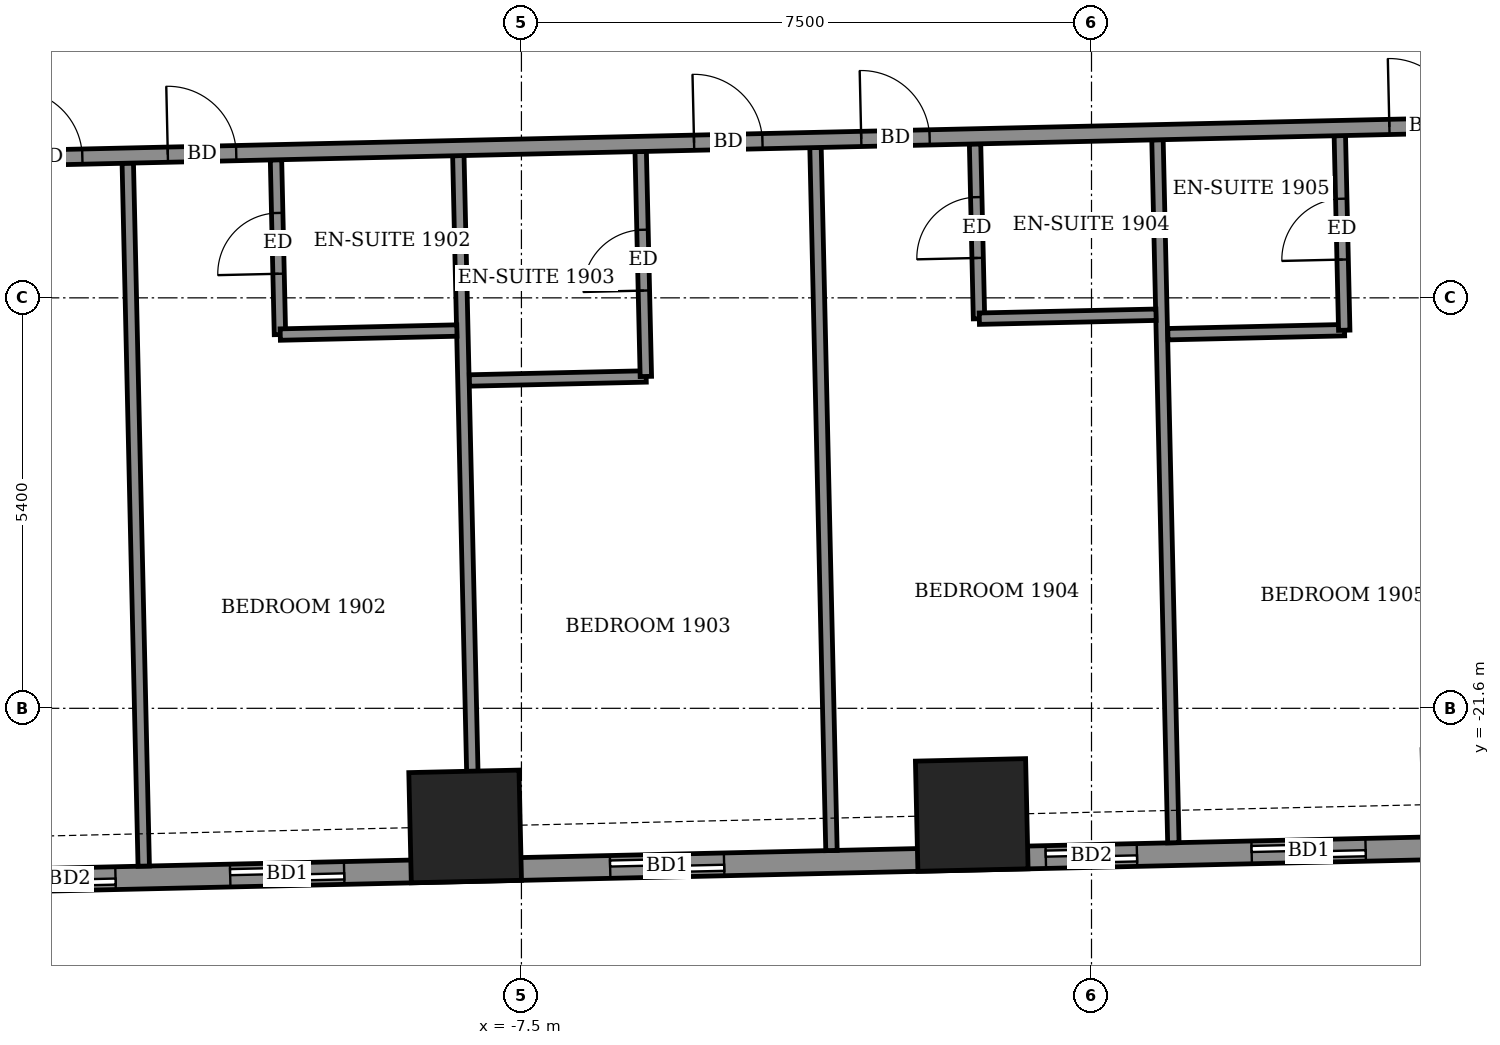
"""IFC4 building model, lengths in metres.
Left out: names, types, materials, properties, quantities, classifications, styles, units other than length and angle.
Written with IfcOpenShell. Run it as: python <this file> out.ifc"""

import sys

from ifc_helpers import new_model, si_unit, direction, frame, frame_2d, origin, origin_2d, place, context, subcontext, project, spatial, rectangle, extrude, element, fill, save


model = new_model("IFC4")
c1 = context("Model", 3, precision=1e-05, world=origin(), true_north=direction((0.0, 1.0)))
c2 = subcontext(c1, "Body", "Model", "MODEL_VIEW")
j1 = project(units=[si_unit("LENGTHUNIT", "METRE"), si_unit("PLANEANGLEUNIT", "RADIAN")], contexts=[c1])
p1 = place(None, origin())
s1 = spatial("IfcSite", under=j1, at=p1, CompositionType="ELEMENT")
p2 = place(p1, origin())
s2 = spatial("IfcBuilding", under=s1, at=p2, CompositionType="ELEMENT")
p3 = place(p2, frame((0.0, 0.0, 79.3)))
s3 = spatial("IfcBuildingStorey", under=s2, at=p3, CompositionType="ELEMENT", Elevation=79.3)
for number, where, z_axis, x_axis in (
    (1, (-8.24, -23.154, -0.55), (0.0, 0.0, 1.0), (1.0, 0.023, 0.0)),
    (2, (-1.575, -23.003, -0.55), (0.0, 0.0, 1.0), (1.0, 0.023, 0.0)),
):
    element("IfcColumn", number, at=place(p3, frame(where, z_axis=z_axis, x_axis=x_axis)), inside=s3, PredefinedType="COLUMN", context=c2, shape_type="SweptSolid", body=[
        extrude(rectangle(XDim=1.45, YDim=1.45, at=origin_2d()), origin(), (0.0, 0.0, 1.0), 3.6),
    ])
p4 = place(p3, frame((-21.409, -24.029, 0.0), z_axis=(0.0, 0.0, 1.0), x_axis=(0.999742634032, 0.022686244721, 0.0)))
e3 = element("IfcWall", 3, at=p4, inside=s3, PredefinedType="SOLIDWALL", context=c2, shape_type="SweptSolid", body=[
    extrude(rectangle(XDim=46.372, YDim=0.3, at=frame_2d((23.186, 0.0))), origin(), (0.0, 0.0, 1.0), 3.05),
])
p5 = place(p4, frame((1.985, 0.0, 0.0)))
e4 = element("IfcOpeningElement", 4, at=p5, cuts=e3, PredefinedType="OPENING", context=c2, shape_type="SweptSolid", body=[
    extrude(rectangle(XDim=1.5, YDim=2.4, at=frame_2d((0.75, 1.2))), frame((0.0, 0.16, 0.0), z_axis=(0.0, -1.0, 0.0), x_axis=(1.0, 0.0, 0.0)), (0.0, 0.0, 1.0), 0.32),
])
p6 = place(p4, frame((7.371, 0.0, 0.0)))
e5 = element("IfcOpeningElement", 5, at=p6, cuts=e3, PredefinedType="OPENING", context=c2, shape_type="SweptSolid", body=[
    extrude(rectangle(XDim=1.2, YDim=2.4, at=frame_2d((0.6, 1.2))), frame((0.0, 0.16, 0.0), z_axis=(0.0, -1.0, 0.0), x_axis=(1.0, 0.0, 0.0)), (0.0, 0.0, 1.0), 0.32),
])
p7 = place(p4, frame((10.08, 0.0, 0.0)))
e6 = element("IfcOpeningElement", 6, at=p7, cuts=e3, PredefinedType="OPENING", context=c2, shape_type="SweptSolid", body=[
    extrude(rectangle(XDim=1.5, YDim=2.4, at=frame_2d((0.75, 1.2))), frame((0.0, 0.16, 0.0), z_axis=(0.0, -1.0, 0.0), x_axis=(1.0, 0.0, 0.0)), (0.0, 0.0, 1.0), 0.32),
])
p8 = place(p4, frame((15.08, 0.0, 0.0)))
e7 = element("IfcOpeningElement", 7, at=p8, cuts=e3, PredefinedType="OPENING", context=c2, shape_type="SweptSolid", body=[
    extrude(rectangle(XDim=1.5, YDim=2.4, at=frame_2d((0.75, 1.2))), frame((0.0, 0.16, 0.0), z_axis=(0.0, -1.0, 0.0), x_axis=(1.0, 0.0, 0.0)), (0.0, 0.0, 1.0), 0.32),
])
p9 = place(p4, frame((20.813, 0.0, 0.0)))
e8 = element("IfcOpeningElement", 8, at=p9, cuts=e3, PredefinedType="OPENING", context=c2, shape_type="SweptSolid", body=[
    extrude(rectangle(XDim=1.2, YDim=2.4, at=frame_2d((0.6, 1.2))), frame((0.0, 0.16, 0.0), z_axis=(0.0, -1.0, 0.0), x_axis=(1.0, 0.0, 0.0)), (0.0, 0.0, 1.0), 0.32),
])
p10 = place(p4, frame((23.522, 0.0, 0.0)))
e9 = element("IfcOpeningElement", 9, at=p10, cuts=e3, PredefinedType="OPENING", context=c2, shape_type="SweptSolid", body=[
    extrude(rectangle(XDim=1.5, YDim=2.4, at=frame_2d((0.75, 1.2))), frame((0.0, 0.16, 0.0), z_axis=(0.0, -1.0, 0.0), x_axis=(1.0, 0.0, 0.0)), (0.0, 0.0, 1.0), 0.32),
])
p11 = place(p4, frame((28.7, 0.0, 0.0)))
e10 = element("IfcOpeningElement", 10, at=p11, cuts=e3, PredefinedType="OPENING", context=c2, shape_type="SweptSolid", body=[
    extrude(rectangle(XDim=1.5, YDim=2.4, at=frame_2d((0.75, 1.2))), frame((0.0, 0.16, 0.0), z_axis=(0.0, -1.0, 0.0), x_axis=(1.0, 0.0, 0.0)), (0.0, 0.0, 1.0), 0.32),
])
p12 = place(p4, frame((34.206, 0.0, 0.0)))
e11 = element("IfcOpeningElement", 11, at=p12, cuts=e3, PredefinedType="OPENING", context=c2, shape_type="SweptSolid", body=[
    extrude(rectangle(XDim=1.5, YDim=2.4, at=frame_2d((0.75, 1.2))), frame((0.0, 0.16, 0.0), z_axis=(0.0, -1.0, 0.0), x_axis=(1.0, 0.0, 0.0)), (0.0, 0.0, 1.0), 0.32),
])
p13 = place(p4, frame((37.065, 0.0, 0.0)))
e12 = element("IfcOpeningElement", 12, at=p13, cuts=e3, PredefinedType="OPENING", context=c2, shape_type="SweptSolid", body=[
    extrude(rectangle(XDim=1.5, YDim=2.4, at=frame_2d((0.75, 1.2))), frame((0.0, 0.16, 0.0), z_axis=(0.0, -1.0, 0.0), x_axis=(1.0, 0.0, 0.0)), (0.0, 0.0, 1.0), 0.32),
])
p14 = place(p4, frame((41.698, 0.0, 0.9)))
e13 = element("IfcOpeningElement", 13, at=p14, cuts=e3, PredefinedType="OPENING", context=c2, shape_type="SweptSolid", body=[
    extrude(rectangle(XDim=2.4, YDim=1.5, at=frame_2d((1.2, 0.75))), frame((0.0, 0.16, 0.0), z_axis=(0.0, -1.0, 0.0), x_axis=(1.0, 0.0, 0.0)), (0.0, 0.0, 1.0), 0.32),
])
p15 = place(p3, frame((-12.469, -23.676, 0.0), z_axis=(0.0, 0.0, 1.0), x_axis=(-0.022697424684, 0.999742380272, 0.0)))
e14 = element("IfcWall", 14, at=p15, inside=s3, PredefinedType="PARTITIONING", context=c2, shape_type="SweptSolid", body=[
    extrude(rectangle(XDim=9.25, YDim=0.15, at=frame_2d((4.625, 0.0))), origin(), (0.0, 0.0, 1.0), 2.55),
])
p16 = place(p3, frame((-8.12, -23.577, 0.0), z_axis=(0.0, 0.0, 1.0), x_axis=(-0.022698023584, 0.999742366675, 0.0)))
e15 = element("IfcWall", 15, at=p16, inside=s3, PredefinedType="PARTITIONING", context=c2, shape_type="SweptSolid", body=[
    extrude(rectangle(XDim=9.25, YDim=0.15, at=frame_2d((4.625, 0.0))), origin(), (0.0, 0.0, 1.0), 3.05),
])
p17 = place(p3, frame((-3.421, -23.471, 0.0), z_axis=(0.0, 0.0, 1.0), x_axis=(-0.022723803418, 0.999741781041, 0.0)))
e16 = element("IfcWall", 16, at=p17, inside=s3, PredefinedType="PARTITIONING", context=c2, shape_type="SweptSolid", body=[
    extrude(rectangle(XDim=9.25, YDim=0.15, at=frame_2d((4.625, 0.0))), origin(), (0.0, 0.0, 1.0), 2.55),
])
p18 = place(p3, frame((1.077, -23.369, 0.0), z_axis=(0.0, 0.0, 1.0), x_axis=(-0.022592505393, 0.999744756775, 0.0)))
e17 = element("IfcWall", 17, at=p18, inside=s3, PredefinedType="PARTITIONING", context=c2, shape_type="SweptSolid", body=[
    extrude(rectangle(XDim=9.25, YDim=0.15, at=frame_2d((4.625, 0.0))), origin(), (0.0, 0.0, 1.0), 2.55),
])
p19 = place(p3, frame((-8.184, -17.287, 0.0), z_axis=(0.0, 0.0, 1.0), x_axis=(0.999738137323, 0.022883548292, 0.0)))
e18 = element("IfcWall", 18, at=p19, inside=s3, PredefinedType="PARTITIONING", context=c2, shape_type="SweptSolid", body=[
    extrude(rectangle(XDim=2.326, YDim=0.15, at=frame_2d((1.163, 0.0))), origin(), (0.0, 0.0, 1.0), 3.05),
])
p20 = place(p3, frame((-5.863, -17.234, 0.0), z_axis=(0.0, 0.0, 1.0), x_axis=(-0.022931262231, 0.999737044033, 0.0)))
e19 = element("IfcWall", 19, at=p20, inside=s3, PredefinedType="PARTITIONING", context=c2, shape_type="SweptSolid", body=[
    extrude(rectangle(XDim=2.96, YDim=0.15, at=frame_2d((1.48, 0.0))), origin(), (0.0, 0.0, 1.0), 3.05),
])
p21 = place(p20, frame((1.13, 0.0, 0.0)))
e20 = element("IfcOpeningElement", 20, at=p21, cuts=e19, PredefinedType="OPENING", context=c2, shape_type="SweptSolid", body=[
    extrude(rectangle(XDim=0.8, YDim=2.1, at=frame_2d((0.4, 1.05))), frame((0.0, 0.085, 0.0), z_axis=(0.0, -1.0, 0.0), x_axis=(1.0, 0.0, 0.0)), (0.0, 0.0, 1.0), 0.17),
])
p22 = place(p3, frame((1.005, -16.678, 0.0), z_axis=(0.0, 0.0, 1.0), x_axis=(0.99974031529, 0.022788198363, 0.0)))
e21 = element("IfcWall", 21, at=p22, inside=s3, PredefinedType="PARTITIONING", context=c2, shape_type="SweptSolid", body=[
    extrude(rectangle(XDim=2.325, YDim=0.15, at=frame_2d((1.162, 0.0))), origin(), (0.0, 0.0, 1.0), 3.05),
])
p23 = place(p3, frame((3.325, -16.626, 0.0), z_axis=(0.0, 0.0, 1.0), x_axis=(-0.022595793415, 0.999744682466, 0.0)))
e22 = element("IfcWall", 22, at=p23, inside=s3, PredefinedType="PARTITIONING", context=c2, shape_type="SweptSolid", body=[
    extrude(rectangle(XDim=2.561, YDim=0.15, at=frame_2d((1.28, 0.0))), origin(), (0.0, 0.0, 1.0), 3.05),
])
p24 = place(p23, frame((0.93, 0.0, 0.0)))
e23 = element("IfcOpeningElement", 23, at=p24, cuts=e22, PredefinedType="OPENING", context=c2, shape_type="SweptSolid", body=[
    extrude(rectangle(XDim=0.8, YDim=2.1, at=frame_2d((0.4, 1.05))), frame((0.0, 0.085, 0.0), z_axis=(0.0, -1.0, 0.0), x_axis=(1.0, 0.0, 0.0)), (0.0, 0.0, 1.0), 0.17),
])
p25 = place(p3, frame((-10.677, -16.683, 0.0), z_axis=(0.0, 0.0, 1.0), x_axis=(-0.022612884682, 0.999744296031, 0.0)))
e24 = element("IfcWall", 24, at=p25, inside=s3, PredefinedType="PARTITIONING", context=c2, shape_type="SweptSolid", body=[
    extrude(rectangle(XDim=2.3, YDim=0.15, at=frame_2d((1.15, 0.0))), origin(), (0.0, 0.0, 1.0), 3.05),
])
p26 = place(p25, frame((0.8, 0.0, 0.0)))
e25 = element("IfcOpeningElement", 25, at=p26, cuts=e24, PredefinedType="OPENING", context=c2, shape_type="SweptSolid", body=[
    extrude(rectangle(XDim=0.8, YDim=2.1, at=frame_2d((0.4, 1.05))), frame((0.0, 0.085, 0.0), z_axis=(0.0, -1.0, 0.0), x_axis=(1.0, 0.0, 0.0)), (0.0, 0.0, 1.0), 0.17),
])
p27 = place(p3, frame((-10.673, -16.683, 0.0), z_axis=(0.0, 0.0, 1.0), x_axis=(0.999737862264, 0.022895561926, 0.0)))
e26 = element("IfcWall", 26, at=p27, inside=s3, PredefinedType="PARTITIONING", context=c2, shape_type="SweptSolid", body=[
    extrude(rectangle(XDim=2.324, YDim=0.15, at=frame_2d((1.162, 0.0))), origin(), (0.0, 0.0, 1.0), 3.05),
])
p28 = place(p3, frame((-1.48, -16.475, 0.0), z_axis=(0.0, 0.0, 1.0), x_axis=(-0.022603288534, 0.999744513037, 0.0)))
e27 = element("IfcWall", 27, at=p28, inside=s3, PredefinedType="PARTITIONING", context=c2, shape_type="SweptSolid", body=[
    extrude(rectangle(XDim=2.301, YDim=0.15, at=frame_2d((1.15, 0.0))), origin(), (0.0, 0.0, 1.0), 3.05),
])
p29 = place(p28, frame((0.8, 0.0, 0.0)))
e28 = element("IfcOpeningElement", 28, at=p29, cuts=e27, PredefinedType="OPENING", context=c2, shape_type="SweptSolid", body=[
    extrude(rectangle(XDim=0.8, YDim=2.1, at=frame_2d((0.4, 1.05))), frame((0.0, 0.085, 0.0), z_axis=(0.0, -1.0, 0.0), x_axis=(1.0, 0.0, 0.0)), (0.0, 0.0, 1.0), 0.17),
])
p30 = place(p3, frame((-1.476, -16.474, 0.0), z_axis=(0.0, 0.0, 1.0), x_axis=(0.999750007167, 0.022358961731, 0.0)))
e29 = element("IfcWall", 29, at=p30, inside=s3, PredefinedType="PARTITIONING", context=c2, shape_type="SweptSolid", body=[
    extrude(rectangle(XDim=2.326, YDim=0.15, at=frame_2d((1.163, 0.0))), origin(), (0.0, 0.0, 1.0), 3.05),
])
p31 = place(p3, frame((-24.249, -14.591, 0.0), z_axis=(0.0, 0.0, 1.0), x_axis=(0.999742227308, 0.022704161211, 0.0)))
e30 = element("IfcWall", 30, at=p31, inside=s3, PredefinedType="PARTITIONING", context=c2, shape_type="SweptSolid", body=[
    extrude(rectangle(XDim=52.421, YDim=0.2, at=frame_2d((26.211, 0.0))), origin(), (0.0, 0.0, 1.0), 3.05),
])
p32 = place(p31, frame((0.575, 0.0, 0.0)))
e31 = element("IfcOpeningElement", 31, at=p32, cuts=e30, PredefinedType="OPENING", context=c2, shape_type="SweptSolid", body=[
    extrude(rectangle(XDim=1.0, YDim=2.1, at=frame_2d((0.5, 1.05))), frame((0.0, 0.11, 0.0), z_axis=(0.0, -1.0, 0.0), x_axis=(1.0, 0.0, 0.0)), (0.0, 0.0, 1.0), 0.22),
])
p33 = place(p31, frame((5.225, 0.0, 0.0)))
e32 = element("IfcOpeningElement", 32, at=p33, cuts=e30, PredefinedType="OPENING", context=c2, shape_type="SweptSolid", body=[
    extrude(rectangle(XDim=0.9, YDim=2.1, at=frame_2d((0.45, 1.05))), frame((0.0, 0.11, 0.0), z_axis=(0.0, -1.0, 0.0), x_axis=(1.0, 0.0, 0.0)), (0.0, 0.0, 1.0), 0.22),
])
p34 = place(p31, frame((10.075, 0.0, 0.0)))
e33 = element("IfcOpeningElement", 33, at=p34, cuts=e30, PredefinedType="OPENING", context=c2, shape_type="SweptSolid", body=[
    extrude(rectangle(XDim=0.9, YDim=2.1, at=frame_2d((0.45, 1.05))), frame((0.0, 0.11, 0.0), z_axis=(0.0, -1.0, 0.0), x_axis=(1.0, 0.0, 0.0)), (0.0, 0.0, 1.0), 0.22),
])
p35 = place(p31, frame((12.1, 0.0, 0.0)))
e34 = element("IfcOpeningElement", 34, at=p35, cuts=e30, PredefinedType="OPENING", context=c2, shape_type="SweptSolid", body=[
    extrude(rectangle(XDim=0.9, YDim=2.1, at=frame_2d((0.45, 1.05))), frame((0.0, 0.11, 0.0), z_axis=(0.0, -1.0, 0.0), x_axis=(1.0, 0.0, 0.0)), (0.0, 0.0, 1.0), 0.22),
])
p36 = place(p31, frame((19.025, 0.0, 0.0)))
e35 = element("IfcOpeningElement", 35, at=p36, cuts=e30, PredefinedType="OPENING", context=c2, shape_type="SweptSolid", body=[
    extrude(rectangle(XDim=0.9, YDim=2.1, at=frame_2d((0.45, 1.05))), frame((0.0, 0.11, 0.0), z_axis=(0.0, -1.0, 0.0), x_axis=(1.0, 0.0, 0.0)), (0.0, 0.0, 1.0), 0.22),
])
p37 = place(p31, frame((21.225, 0.0, 0.0)))
e36 = element("IfcOpeningElement", 36, at=p37, cuts=e30, PredefinedType="OPENING", context=c2, shape_type="SweptSolid", body=[
    extrude(rectangle(XDim=0.9, YDim=2.1, at=frame_2d((0.45, 1.05))), frame((0.0, 0.11, 0.0), z_axis=(0.0, -1.0, 0.0), x_axis=(1.0, 0.0, 0.0)), (0.0, 0.0, 1.0), 0.22),
])
p38 = place(p31, frame((28.175, 0.0, 0.0)))
e37 = element("IfcOpeningElement", 37, at=p38, cuts=e30, PredefinedType="OPENING", context=c2, shape_type="SweptSolid", body=[
    extrude(rectangle(XDim=0.9, YDim=2.1, at=frame_2d((0.45, 1.05))), frame((0.0, 0.11, 0.0), z_axis=(0.0, -1.0, 0.0), x_axis=(1.0, 0.0, 0.0)), (0.0, 0.0, 1.0), 0.22),
])
p39 = place(p31, frame((30.425, 0.0, 0.0)))
e38 = element("IfcOpeningElement", 38, at=p39, cuts=e30, PredefinedType="OPENING", context=c2, shape_type="SweptSolid", body=[
    extrude(rectangle(XDim=0.9, YDim=2.1, at=frame_2d((0.45, 1.05))), frame((0.0, 0.11, 0.0), z_axis=(0.0, -1.0, 0.0), x_axis=(1.0, 0.0, 0.0)), (0.0, 0.0, 1.0), 0.22),
])
p40 = place(p31, frame((37.4, 0.0, 0.0)))
e39 = element("IfcOpeningElement", 39, at=p40, cuts=e30, PredefinedType="OPENING", context=c2, shape_type="SweptSolid", body=[
    extrude(rectangle(XDim=0.9, YDim=2.1, at=frame_2d((0.45, 1.05))), frame((0.0, 0.11, 0.0), z_axis=(0.0, -1.0, 0.0), x_axis=(1.0, 0.0, 0.0)), (0.0, 0.0, 1.0), 0.22),
])
p41 = place(p31, frame((39.375, 0.0, 0.0)))
e40 = element("IfcOpeningElement", 40, at=p41, cuts=e30, PredefinedType="OPENING", context=c2, shape_type="SweptSolid", body=[
    extrude(rectangle(XDim=0.9, YDim=2.1, at=frame_2d((0.45, 1.05))), frame((0.0, 0.11, 0.0), z_axis=(0.0, -1.0, 0.0), x_axis=(1.0, 0.0, 0.0)), (0.0, 0.0, 1.0), 0.22),
])
p42 = place(p31, frame((49.661, 0.0, 0.0)))
e41 = element("IfcOpeningElement", 41, at=p42, cuts=e30, PredefinedType="OPENING", context=c2, shape_type="SweptSolid", body=[
    extrude(rectangle(XDim=1.0, YDim=2.1, at=frame_2d((0.5, 1.05))), frame((0.0, 0.11, 0.0), z_axis=(0.0, -1.0, 0.0), x_axis=(1.0, 0.0, 0.0)), (0.0, 0.0, 1.0), 0.22),
])
p43 = place(p31, frame((44.025, 0.0, 0.0)))
e42 = element("IfcOpeningElement", 42, at=p43, cuts=e30, PredefinedType="OPENING", context=c2, shape_type="SweptSolid", body=[
    extrude(rectangle(XDim=0.9, YDim=2.1, at=frame_2d((0.45, 1.05))), frame((0.0, 0.11, 0.0), z_axis=(0.0, -1.0, 0.0), x_axis=(1.0, 0.0, 0.0)), (0.0, 0.0, 1.0), 0.22),
])
p44 = place(p6, origin())
e43 = element("IfcDoor", 43, at=p44, inside=s3, OperationType="SLIDING_TO_LEFT", PredefinedType="DOOR", context=c2, shape_type="SweptSolid", body=[
    extrude(rectangle(XDim=1.2, YDim=2.4, at=frame_2d((0.6, 1.2))), frame((0.0, 0.025, 0.0), z_axis=(0.0, -1.0, 0.0), x_axis=(1.0, 0.0, 0.0)), (0.0, 0.0, 1.0), 0.05),
])
fill(e5, e43)
p45 = place(p7, origin())
e44 = element("IfcDoor", 44, at=p45, inside=s3, OperationType="SLIDING_TO_LEFT", PredefinedType="DOOR", context=c2, shape_type="SweptSolid", body=[
    extrude(rectangle(XDim=1.5, YDim=2.4, at=frame_2d((0.75, 1.2))), frame((0.0, 0.025, 0.0), z_axis=(0.0, -1.0, 0.0), x_axis=(1.0, 0.0, 0.0)), (0.0, 0.0, 1.0), 0.05),
])
fill(e6, e44)
p46 = place(p8, origin())
e45 = element("IfcDoor", 45, at=p46, inside=s3, OperationType="SLIDING_TO_LEFT", PredefinedType="DOOR", context=c2, shape_type="SweptSolid", body=[
    extrude(rectangle(XDim=1.5, YDim=2.4, at=frame_2d((0.75, 1.2))), frame((0.0, 0.025, 0.0), z_axis=(0.0, -1.0, 0.0), x_axis=(1.0, 0.0, 0.0)), (0.0, 0.0, 1.0), 0.05),
])
fill(e7, e45)
p47 = place(p9, origin())
e46 = element("IfcDoor", 46, at=p47, inside=s3, OperationType="SLIDING_TO_LEFT", PredefinedType="DOOR", context=c2, shape_type="SweptSolid", body=[
    extrude(rectangle(XDim=1.2, YDim=2.4, at=frame_2d((0.6, 1.2))), frame((0.0, 0.025, 0.0), z_axis=(0.0, -1.0, 0.0), x_axis=(1.0, 0.0, 0.0)), (0.0, 0.0, 1.0), 0.05),
])
fill(e8, e46)
p48 = place(p10, origin())
e47 = element("IfcDoor", 47, at=p48, inside=s3, OperationType="SLIDING_TO_LEFT", PredefinedType="DOOR", context=c2, shape_type="SweptSolid", body=[
    extrude(rectangle(XDim=1.5, YDim=2.4, at=frame_2d((0.75, 1.2))), frame((0.0, 0.025, 0.0), z_axis=(0.0, -1.0, 0.0), x_axis=(1.0, 0.0, 0.0)), (0.0, 0.0, 1.0), 0.05),
])
fill(e9, e47)
p49 = place(p34, origin())
e48 = element("IfcDoor", 48, at=p49, inside=s3, OperationType="SINGLE_SWING_LEFT", PredefinedType="DOOR", context=c2, shape_type="SweptSolid", body=[
    extrude(rectangle(XDim=0.9, YDim=2.1, at=frame_2d((0.45, 1.05))), frame((0.0, 0.025, 0.0), z_axis=(0.0, -1.0, 0.0), x_axis=(1.0, 0.0, 0.0)), (0.0, 0.0, 1.0), 0.05),
])
fill(e33, e48)
p50 = place(p35, origin())
e49 = element("IfcDoor", 49, at=p50, inside=s3, OperationType="SINGLE_SWING_RIGHT", PredefinedType="DOOR", context=c2, shape_type="SweptSolid", body=[
    extrude(rectangle(XDim=0.9, YDim=2.1, at=frame_2d((0.45, 1.05))), frame((0.0, 0.025, 0.0), z_axis=(0.0, -1.0, 0.0), x_axis=(1.0, 0.0, 0.0)), (0.0, 0.0, 1.0), 0.05),
])
fill(e34, e49)
p51 = place(p26, origin())
e50 = element("IfcDoor", 50, at=p51, inside=s3, OperationType="SINGLE_SWING_RIGHT", PredefinedType="DOOR", context=c2, shape_type="SweptSolid", body=[
    extrude(rectangle(XDim=0.8, YDim=2.1, at=frame_2d((0.4, 1.05))), frame((0.0, 0.025, 0.0), z_axis=(0.0, -1.0, 0.0), x_axis=(1.0, 0.0, 0.0)), (0.0, 0.0, 1.0), 0.05),
])
fill(e25, e50)
p52 = place(p36, origin())
e51 = element("IfcDoor", 51, at=p52, inside=s3, OperationType="SINGLE_SWING_LEFT", PredefinedType="DOOR", context=c2, shape_type="SweptSolid", body=[
    extrude(rectangle(XDim=0.9, YDim=2.1, at=frame_2d((0.45, 1.05))), frame((0.0, 0.025, 0.0), z_axis=(0.0, -1.0, 0.0), x_axis=(1.0, 0.0, 0.0)), (0.0, 0.0, 1.0), 0.05),
])
fill(e35, e51)
p53 = place(p21, origin())
e52 = element("IfcDoor", 52, at=p53, inside=s3, OperationType="SINGLE_SWING_LEFT", PredefinedType="DOOR", context=c2, shape_type="SweptSolid", body=[
    extrude(rectangle(XDim=0.8, YDim=2.1, at=frame_2d((0.4, 1.05))), frame((0.0, 0.025, 0.0), z_axis=(0.0, -1.0, 0.0), x_axis=(1.0, 0.0, 0.0)), (0.0, 0.0, 1.0), 0.05),
])
fill(e20, e52)
p54 = place(p37, origin())
e53 = element("IfcDoor", 53, at=p54, inside=s3, OperationType="SINGLE_SWING_RIGHT", PredefinedType="DOOR", context=c2, shape_type="SweptSolid", body=[
    extrude(rectangle(XDim=0.9, YDim=2.1, at=frame_2d((0.45, 1.05))), frame((0.0, 0.025, 0.0), z_axis=(0.0, -1.0, 0.0), x_axis=(1.0, 0.0, 0.0)), (0.0, 0.0, 1.0), 0.05),
])
fill(e36, e53)
p55 = place(p29, origin())
e54 = element("IfcDoor", 54, at=p55, inside=s3, OperationType="SINGLE_SWING_RIGHT", PredefinedType="DOOR", context=c2, shape_type="SweptSolid", body=[
    extrude(rectangle(XDim=0.8, YDim=2.1, at=frame_2d((0.4, 1.05))), frame((0.0, 0.025, 0.0), z_axis=(0.0, -1.0, 0.0), x_axis=(1.0, 0.0, 0.0)), (0.0, 0.0, 1.0), 0.05),
])
fill(e28, e54)
p56 = place(p38, origin())
e55 = element("IfcDoor", 55, at=p56, inside=s3, OperationType="SINGLE_SWING_LEFT", PredefinedType="DOOR", context=c2, shape_type="SweptSolid", body=[
    extrude(rectangle(XDim=0.9, YDim=2.1, at=frame_2d((0.45, 1.05))), frame((0.0, 0.025, 0.0), z_axis=(0.0, -1.0, 0.0), x_axis=(1.0, 0.0, 0.0)), (0.0, 0.0, 1.0), 0.05),
])
fill(e37, e55)
p57 = place(p24, origin())
e56 = element("IfcDoor", 56, at=p57, inside=s3, OperationType="SINGLE_SWING_LEFT", PredefinedType="DOOR", context=c2, shape_type="SweptSolid", body=[
    extrude(rectangle(XDim=0.8, YDim=2.1, at=frame_2d((0.4, 1.05))), frame((0.0, 0.025, 0.0), z_axis=(0.0, -1.0, 0.0), x_axis=(1.0, 0.0, 0.0)), (0.0, 0.0, 1.0), 0.05),
])
fill(e23, e56)
save(model, sys.argv[1])
